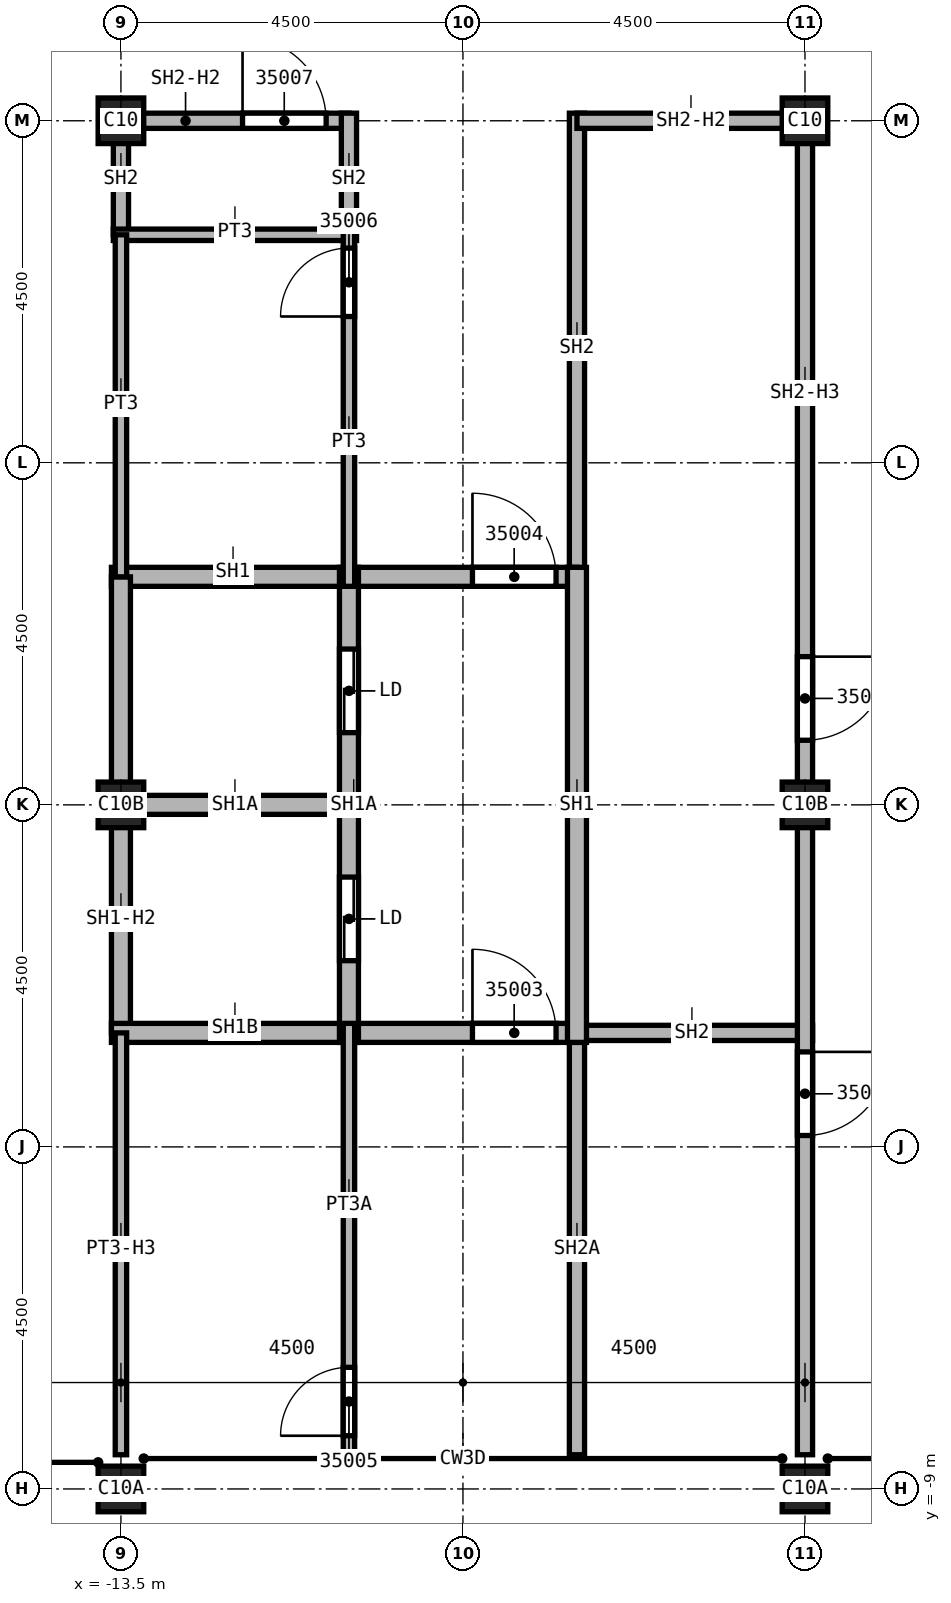
"""IFC4 building model, lengths in metres.
Left out: names, types, materials, properties, quantities, classifications, styles, units other than length and angle.
Written with IfcOpenShell. Run it as: python <this file> out.ifc"""

import sys

from ifc_helpers import new_model, si_unit, direction, frame, frame_2d, origin, origin_2d, place, context, subcontext, project, spatial, rectangle, extrude, element, fill, save


model = new_model("IFC4")
c1 = context("Model", 3, precision=1e-05, world=origin(), true_north=direction((0.0, 1.0)))
c2 = subcontext(c1, "Body", "Model", "MODEL_VIEW")
j1 = project(units=[si_unit("LENGTHUNIT", "METRE"), si_unit("PLANEANGLEUNIT", "RADIAN")], contexts=[c1])
p1 = place(None, origin())
s1 = spatial("IfcSite", under=j1, at=p1, CompositionType="ELEMENT")
p2 = place(p1, origin())
s2 = spatial("IfcBuilding", under=s1, at=p2, CompositionType="ELEMENT")
p3 = place(p2, frame((0.0, 0.0, 376.0)))
s3 = spatial("IfcBuildingStorey", under=s2, at=p3, CompositionType="ELEMENT", Elevation=376.0)
p4 = place(p3, frame((-4.5, 0.0, 0.0), z_axis=(0.0, 0.0, 1.0), x_axis=(1.0, 0.0, 0.0)))
e1 = element("IfcColumn", 1, at=p4, inside=s3, PredefinedType="COLUMN", context=c2, shape_type="SweptSolid", body=[
    extrude(rectangle(XDim=0.6, YDim=0.6, at=origin_2d()), origin(), (0.0, 0.0, 1.0), 7.919),
])
p5 = place(p3, frame((-4.5, 9.0, 0.0), z_axis=(0.0, 0.0, 1.0), x_axis=(1.0, 0.0, 0.0)))
e2 = element("IfcColumn", 2, at=p5, inside=s3, PredefinedType="COLUMN", context=c2, shape_type="SweptSolid", body=[
    extrude(rectangle(XDim=0.6, YDim=0.6, at=origin_2d()), origin(), (0.0, 0.0, 1.0), 4.6),
])
p6 = place(p3, frame((-4.5, -9.0, 0.0), z_axis=(0.0, 0.0, 1.0), x_axis=(1.0, 0.0, 0.0)))
e3 = element("IfcColumn", 3, at=p6, inside=s3, PredefinedType="COLUMN", context=c2, shape_type="SweptSolid", body=[
    extrude(rectangle(XDim=0.6, YDim=0.6, at=origin_2d()), origin(), (0.0, 0.0, 1.0), 3.725),
])
p7 = place(p3, frame((-13.5, 0.0, 0.0), z_axis=(0.0, 0.0, 1.0), x_axis=(1.0, 0.0, 0.0)))
e4 = element("IfcColumn", 4, at=p7, inside=s3, PredefinedType="COLUMN", context=c2, shape_type="SweptSolid", body=[
    extrude(rectangle(XDim=0.6, YDim=0.6, at=origin_2d()), origin(), (0.0, 0.0, 1.0), 7.919),
])
p8 = place(p3, frame((-13.5, 9.0, 0.0), z_axis=(0.0, 0.0, 1.0), x_axis=(1.0, 0.0, 0.0)))
e5 = element("IfcColumn", 5, at=p8, inside=s3, PredefinedType="COLUMN", context=c2, shape_type="SweptSolid", body=[
    extrude(rectangle(XDim=0.6, YDim=0.6, at=origin_2d()), origin(), (0.0, 0.0, 1.0), 4.6),
])
p9 = place(p3, frame((-13.5, -9.0, 0.0), z_axis=(0.0, 0.0, 1.0), x_axis=(1.0, 0.0, 0.0)))
e6 = element("IfcColumn", 6, at=p9, inside=s3, PredefinedType="COLUMN", context=c2, shape_type="SweptSolid", body=[
    extrude(rectangle(XDim=0.6, YDim=0.6, at=origin_2d()), origin(), (0.0, 0.0, 1.0), 3.725),
])
p10 = place(p3, frame((-13.5, 7.5, 0.0), z_axis=(0.0, 0.0, 1.0), x_axis=(0.0, 1.0, 0.0)))
e7 = element("IfcWall", 7, at=p10, inside=s3, PredefinedType="SOLIDWALL", context=c2, shape_type="SweptSolid", body=[
    extrude(rectangle(XDim=1.6, YDim=0.2, at=frame_2d((0.8, 0.0))), origin(), (0.0, 0.0, 1.0), 4.15),
])
p11 = place(p3, frame((-13.5, 9.0, 0.0), z_axis=(0.0, 0.0, 1.0), x_axis=(1.0, 0.0, 0.0)))
e8 = element("IfcWall", 8, at=p11, inside=s3, PredefinedType="SOLIDWALL", context=c2, shape_type="SweptSolid", body=[
    extrude(rectangle(XDim=3.0, YDim=0.2, at=frame_2d((1.5, 0.0))), origin(), (0.0, 0.0, 1.0), 3.754),
])
p12 = place(p11, frame((1.6, 0.0, 0.0)))
e9 = element("IfcOpeningElement", 9, at=p12, cuts=e8, PredefinedType="OPENING", context=c2, shape_type="SweptSolid", body=[
    extrude(rectangle(XDim=1.1, YDim=2.1, at=frame_2d((0.55, 1.05))), frame((0.0, 0.1, 0.0), z_axis=(0.0, -1.0, 0.0), x_axis=(1.0, 0.0, 0.0)), (0.0, 0.0, 1.0), 0.2),
])
p13 = place(p3, frame((-10.5, 7.425, 0.0), z_axis=(0.0, 0.0, 1.0), x_axis=(0.0, 1.0, 0.0)))
e10 = element("IfcWall", 10, at=p13, inside=s3, PredefinedType="SOLIDWALL", context=c2, shape_type="SweptSolid", body=[
    extrude(rectangle(XDim=1.675, YDim=0.2, at=frame_2d((0.837, 0.0))), origin(), (0.0, 0.0, 1.0), 4.15),
])
p14 = place(p3, frame((-7.625, -3.0, 0.0), z_axis=(0.0, 0.0, 1.0), x_axis=(1.0, 0.0, 0.0)))
e11 = element("IfcWall", 11, at=p14, inside=s3, PredefinedType="SOLIDWALL", context=c2, shape_type="SweptSolid", body=[
    extrude(rectangle(XDim=3.225, YDim=0.2, at=frame_2d((1.613, 0.0))), origin(), (0.0, 0.0, 1.0), 4.15),
])
p15 = place(p3, frame((-7.5, -8.55, 0.0), z_axis=(0.0, 0.0, 1.0), x_axis=(0.0, 1.0, 0.0)))
e12 = element("IfcWall", 12, at=p15, inside=s3, PredefinedType="SOLIDWALL", context=c2, shape_type="SweptSolid", body=[
    extrude(rectangle(XDim=5.675, YDim=0.2, at=frame_2d((2.837, 0.0))), origin(), (0.0, 0.0, 1.0), 4.566),
])
p16 = place(p3, frame((-7.5, 2.875, 0.0), z_axis=(0.0, 0.0, 1.0), x_axis=(0.0, 1.0, 0.0)))
e13 = element("IfcWall", 13, at=p16, inside=s3, PredefinedType="SOLIDWALL", context=c2, shape_type="SweptSolid", body=[
    extrude(rectangle(XDim=6.225, YDim=0.2, at=frame_2d((3.113, 0.0))), origin(), (0.0, 0.0, 1.0), 4.15),
])
p17 = place(p3, frame((-7.5, 9.0, 0.0), z_axis=(0.0, 0.0, 1.0), x_axis=(1.0, 0.0, 0.0)))
e14 = element("IfcWall", 14, at=p17, inside=s3, PredefinedType="SOLIDWALL", context=c2, shape_type="SweptSolid", body=[
    extrude(rectangle(XDim=3.0, YDim=0.2, at=frame_2d((1.5, 0.0))), origin(), (0.0, 0.0, 1.0), 3.754),
])
p18 = place(p3, frame((-4.5, 9.1, 0.0), z_axis=(0.0, 0.0, 1.0), x_axis=(0.0, -1.0, 0.0)))
e15 = element("IfcWall", 15, at=p18, inside=s3, PredefinedType="SOLIDWALL", context=c2, shape_type="SweptSolid", body=[
    extrude(rectangle(XDim=17.65, YDim=0.2, at=frame_2d((8.825, 0.0))), origin(), (0.0, 0.0, 1.0), 3.722),
])
p19 = place(p18, frame((12.35, 0.0, 0.0)))
e16 = element("IfcOpeningElement", 16, at=p19, cuts=e15, PredefinedType="OPENING", context=c2, shape_type="SweptSolid", body=[
    extrude(rectangle(XDim=1.1, YDim=2.1, at=frame_2d((0.55, 1.05))), frame((0.0, 0.1, 0.0), z_axis=(0.0, -1.0, 0.0), x_axis=(1.0, 0.0, 0.0)), (0.0, 0.0, 1.0), 0.2),
])
p20 = place(p18, frame((7.15, 0.0, 0.0)))
e17 = element("IfcOpeningElement", 17, at=p20, cuts=e15, PredefinedType="OPENING", context=c2, shape_type="SweptSolid", body=[
    extrude(rectangle(XDim=1.1, YDim=2.1, at=frame_2d((0.55, 1.05))), frame((0.0, 0.1, 0.0), z_axis=(0.0, -1.0, 0.0), x_axis=(1.0, 0.0, 0.0)), (0.0, 0.0, 1.0), 0.2),
])
p21 = place(p3, frame((-13.625, 0.0, 0.0), z_axis=(0.0, 0.0, 1.0), x_axis=(1.0, 0.0, 0.0)))
e18 = element("IfcWall", 18, at=p21, inside=s3, PredefinedType="SOLIDWALL", context=c2, shape_type="SweptSolid", body=[
    extrude(rectangle(XDim=3.125, YDim=0.25, at=frame_2d((1.562, 0.0))), origin(), (0.0, 0.0, 1.0), 7.152),
])
p22 = place(p3, frame((-13.625, 3.0, 0.0), z_axis=(0.0, 0.0, 1.0), x_axis=(1.0, 0.0, 0.0)))
e19 = element("IfcWall", 19, at=p22, inside=s3, PredefinedType="SOLIDWALL", context=c2, shape_type="SweptSolid", body=[
    extrude(rectangle(XDim=6.125, YDim=0.25, at=frame_2d((3.062, 0.0))), origin(), (0.0, 0.0, 1.0), 4.15),
])
p23 = place(p22, frame((4.75, 0.0, 0.0)))
e20 = element("IfcOpeningElement", 20, at=p23, cuts=e19, PredefinedType="OPENING", context=c2, shape_type="SweptSolid", body=[
    extrude(rectangle(XDim=1.1, YDim=2.1, at=frame_2d((0.55, 1.05))), frame((0.0, 0.125, 0.0), z_axis=(0.0, -1.0, 0.0), x_axis=(1.0, 0.0, 0.0)), (0.0, 0.0, 1.0), 0.25),
])
p24 = place(p3, frame((-13.5, -3.0, 0.0), z_axis=(0.0, 0.0, 1.0), x_axis=(0.0, 1.0, 0.0)))
e21 = element("IfcWall", 21, at=p24, inside=s3, PredefinedType="SOLIDWALL", context=c2, shape_type="SweptSolid", body=[
    extrude(rectangle(XDim=6.0, YDim=0.25, at=frame_2d((3.0, 0.0))), origin(), (0.0, 0.0, 1.0), 3.722),
])
p25 = place(p3, frame((-13.625, -3.0, 0.0), z_axis=(0.0, 0.0, 1.0), x_axis=(1.0, 0.0, 0.0)))
e22 = element("IfcWall", 22, at=p25, inside=s3, PredefinedType="SOLIDWALL", context=c2, shape_type="SweptSolid", body=[
    extrude(rectangle(XDim=6.125, YDim=0.25, at=frame_2d((3.062, 0.0))), origin(), (0.0, 0.0, 1.0), 4.566),
])
p26 = place(p25, frame((4.75, 0.0, 0.0)))
e23 = element("IfcOpeningElement", 23, at=p26, cuts=e22, PredefinedType="OPENING", context=c2, shape_type="SweptSolid", body=[
    extrude(rectangle(XDim=1.1, YDim=2.1, at=frame_2d((0.55, 1.05))), frame((0.0, 0.125, 0.0), z_axis=(0.0, -1.0, 0.0), x_axis=(1.0, 0.0, 0.0)), (0.0, 0.0, 1.0), 0.25),
])
p27 = place(p3, frame((-10.5, -3.125, 0.0), z_axis=(0.0, 0.0, 1.0), x_axis=(0.0, 1.0, 0.0)))
e24 = element("IfcWall", 24, at=p27, inside=s3, PredefinedType="SOLIDWALL", context=c2, shape_type="SweptSolid", body=[
    extrude(rectangle(XDim=6.25, YDim=0.25, at=frame_2d((3.125, 0.0))), origin(), (0.0, 0.0, 1.0), 7.152),
])
p28 = place(p27, frame((1.075, 0.0, 0.0)))
e25 = element("IfcOpeningElement", 25, at=p28, cuts=e24, PredefinedType="OPENING", context=c2, shape_type="SweptSolid", body=[
    extrude(rectangle(XDim=1.1, YDim=2.1, at=frame_2d((0.55, 1.05))), frame((0.0, 0.125, 0.0), z_axis=(0.0, -1.0, 0.0), x_axis=(1.0, 0.0, 0.0)), (0.0, 0.0, 1.0), 0.25),
])
p29 = place(p27, frame((4.075, 0.0, 0.0)))
e26 = element("IfcOpeningElement", 26, at=p29, cuts=e24, PredefinedType="OPENING", context=c2, shape_type="SweptSolid", body=[
    extrude(rectangle(XDim=1.1, YDim=2.1, at=frame_2d((0.55, 1.05))), frame((0.0, 0.125, 0.0), z_axis=(0.0, -1.0, 0.0), x_axis=(1.0, 0.0, 0.0)), (0.0, 0.0, 1.0), 0.25),
])
p30 = place(p3, frame((-7.5, -3.125, 0.0), z_axis=(0.0, 0.0, 1.0), x_axis=(0.0, 1.0, 0.0)))
e27 = element("IfcWall", 27, at=p30, inside=s3, PredefinedType="SOLIDWALL", context=c2, shape_type="SweptSolid", body=[
    extrude(rectangle(XDim=6.25, YDim=0.25, at=frame_2d((3.125, 0.0))), origin(), (0.0, 0.0, 1.0), 4.15),
])
p31 = place(p3, frame((-13.6, 7.5, 0.0), z_axis=(0.0, 0.0, 1.0), x_axis=(1.0, 0.0, 0.0)))
e28 = element("IfcWall", 28, at=p31, inside=s3, PredefinedType="PARTITIONING", context=c2, shape_type="SweptSolid", body=[
    extrude(rectangle(XDim=3.1, YDim=0.15, at=frame_2d((1.55, 0.0))), origin(), (0.0, 0.0, 1.0), 4.15),
])
p32 = place(p3, frame((-13.5, -8.55, 0.0), z_axis=(0.0, 0.0, 1.0), x_axis=(0.0, 1.0, 0.0)))
e29 = element("IfcWall", 29, at=p32, inside=s3, PredefinedType="PARTITIONING", context=c2, shape_type="SweptSolid", body=[
    extrude(rectangle(XDim=5.55, YDim=0.15, at=frame_2d((2.775, 0.0))), origin(), (0.0, 0.0, 1.0), 3.722),
])
p33 = place(p3, frame((-13.5, 3.0, 0.0), z_axis=(0.0, 0.0, 1.0), x_axis=(0.0, 1.0, 0.0)))
e30 = element("IfcWall", 30, at=p33, inside=s3, PredefinedType="PARTITIONING", context=c2, shape_type="SweptSolid", body=[
    extrude(rectangle(XDim=4.5, YDim=0.15, at=frame_2d((2.25, 0.0))), origin(), (0.0, 0.0, 1.0), 4.15),
])
p34 = place(p3, frame((-10.5, -8.55, 0.0), z_axis=(0.0, 0.0, 1.0), x_axis=(0.0, 1.0, 0.0)))
e31 = element("IfcWall", 31, at=p34, inside=s3, PredefinedType="PARTITIONING", context=c2, shape_type="SweptSolid", body=[
    extrude(rectangle(XDim=5.675, YDim=0.15, at=frame_2d((2.837, 0.0))), origin(), (0.0, 0.0, 1.0), 4.566),
])
p35 = place(p34, frame((0.25, 0.0, 0.0)))
e32 = element("IfcOpeningElement", 32, at=p35, cuts=e31, PredefinedType="OPENING", context=c2, shape_type="SweptSolid", body=[
    extrude(rectangle(XDim=0.9, YDim=2.1, at=frame_2d((0.45, 1.05))), frame((0.0, 0.075, 0.0), z_axis=(0.0, -1.0, 0.0), x_axis=(1.0, 0.0, 0.0)), (0.0, 0.0, 1.0), 0.15),
])
p36 = place(p3, frame((-10.5, 2.875, 0.0), z_axis=(0.0, 0.0, 1.0), x_axis=(0.0, 1.0, 0.0)))
e33 = element("IfcWall", 33, at=p36, inside=s3, PredefinedType="PARTITIONING", context=c2, shape_type="SweptSolid", body=[
    extrude(rectangle(XDim=4.7, YDim=0.15, at=frame_2d((2.35, 0.0))), origin(), (0.0, 0.0, 1.0), 4.15),
])
p37 = place(p36, frame((3.55, 0.0, 0.0)))
e34 = element("IfcOpeningElement", 34, at=p37, cuts=e33, PredefinedType="OPENING", context=c2, shape_type="SweptSolid", body=[
    extrude(rectangle(XDim=0.9, YDim=2.1, at=frame_2d((0.45, 1.05))), frame((0.0, 0.075, 0.0), z_axis=(0.0, -1.0, 0.0), x_axis=(1.0, 0.0, 0.0)), (0.0, 0.0, 1.0), 0.15),
])
p38 = place(p19, origin())
e35 = element("IfcDoor", 35, at=p38, inside=s3, OperationType="SINGLE_SWING_RIGHT", PredefinedType="DOOR", context=c2, shape_type="SweptSolid", body=[
    extrude(rectangle(XDim=1.1, YDim=2.1, at=frame_2d((0.55, 1.05))), frame((0.0, 0.025, 0.0), z_axis=(0.0, -1.0, 0.0), x_axis=(1.0, 0.0, 0.0)), (0.0, 0.0, 1.0), 0.05),
])
fill(e16, e35)
p39 = place(p20, origin())
e36 = element("IfcDoor", 36, at=p39, inside=s3, OperationType="SINGLE_SWING_LEFT", PredefinedType="DOOR", context=c2, shape_type="SweptSolid", body=[
    extrude(rectangle(XDim=1.1, YDim=2.1, at=frame_2d((0.55, 1.05))), frame((0.0, 0.025, 0.0), z_axis=(0.0, -1.0, 0.0), x_axis=(1.0, 0.0, 0.0)), (0.0, 0.0, 1.0), 0.05),
])
fill(e17, e36)
p40 = place(p26, origin())
e37 = element("IfcDoor", 37, at=p40, inside=s3, OperationType="SINGLE_SWING_RIGHT", PredefinedType="DOOR", context=c2, shape_type="SweptSolid", body=[
    extrude(rectangle(XDim=1.1, YDim=2.1, at=frame_2d((0.55, 1.05))), frame((0.0, 0.025, 0.0), z_axis=(0.0, -1.0, 0.0), x_axis=(1.0, 0.0, 0.0)), (0.0, 0.0, 1.0), 0.05),
])
fill(e23, e37)
p41 = place(p23, origin())
e38 = element("IfcDoor", 38, at=p41, inside=s3, OperationType="SINGLE_SWING_LEFT", PredefinedType="DOOR", context=c2, shape_type="SweptSolid", body=[
    extrude(rectangle(XDim=1.1, YDim=2.1, at=frame_2d((0.55, 1.05))), frame((0.0, 0.025, 0.0), z_axis=(0.0, -1.0, 0.0), x_axis=(1.0, 0.0, 0.0)), (0.0, 0.0, 1.0), 0.05),
])
fill(e20, e38)
p42 = place(p35, origin())
e39 = element("IfcDoor", 39, at=p42, inside=s3, OperationType="SINGLE_SWING_RIGHT", PredefinedType="DOOR", context=c2, shape_type="SweptSolid", body=[
    extrude(rectangle(XDim=0.9, YDim=2.1, at=frame_2d((0.45, 1.05))), frame((0.0, 0.025, 0.0), z_axis=(0.0, -1.0, 0.0), x_axis=(1.0, 0.0, 0.0)), (0.0, 0.0, 1.0), 0.05),
])
fill(e32, e39)
p43 = place(p37, origin())
e40 = element("IfcDoor", 40, at=p43, inside=s3, OperationType="SINGLE_SWING_LEFT", PredefinedType="DOOR", context=c2, shape_type="SweptSolid", body=[
    extrude(rectangle(XDim=0.9, YDim=2.1, at=frame_2d((0.45, 1.05))), frame((0.0, 0.025, 0.0), z_axis=(0.0, -1.0, 0.0), x_axis=(1.0, 0.0, 0.0)), (0.0, 0.0, 1.0), 0.05),
])
fill(e34, e40)
p44 = place(p12, origin())
e41 = element("IfcDoor", 41, at=p44, inside=s3, OperationType="SINGLE_SWING_RIGHT", PredefinedType="DOOR", context=c2, shape_type="SweptSolid", body=[
    extrude(rectangle(XDim=1.1, YDim=2.1, at=frame_2d((0.55, 1.05))), frame((0.0, 0.025, 0.0), z_axis=(0.0, -1.0, 0.0), x_axis=(1.0, 0.0, 0.0)), (0.0, 0.0, 1.0), 0.05),
])
fill(e9, e41)
p45 = place(p28, origin())
e42 = element("IfcDoor", 42, at=p45, inside=s3, OperationType="SLIDING_TO_LEFT", PredefinedType="DOOR", context=c2, shape_type="SweptSolid", body=[
    extrude(rectangle(XDim=1.1, YDim=2.1, at=frame_2d((0.55, 1.05))), frame((0.0, 0.025, 0.0), z_axis=(0.0, -1.0, 0.0), x_axis=(1.0, 0.0, 0.0)), (0.0, 0.0, 1.0), 0.05),
])
fill(e25, e42)
p46 = place(p29, origin())
e43 = element("IfcDoor", 43, at=p46, inside=s3, OperationType="SLIDING_TO_LEFT", PredefinedType="DOOR", context=c2, shape_type="SweptSolid", body=[
    extrude(rectangle(XDim=1.1, YDim=2.1, at=frame_2d((0.55, 1.05))), frame((0.0, 0.025, 0.0), z_axis=(0.0, -1.0, 0.0), x_axis=(1.0, 0.0, 0.0)), (0.0, 0.0, 1.0), 0.05),
])
fill(e26, e43)
save(model, sys.argv[1])
